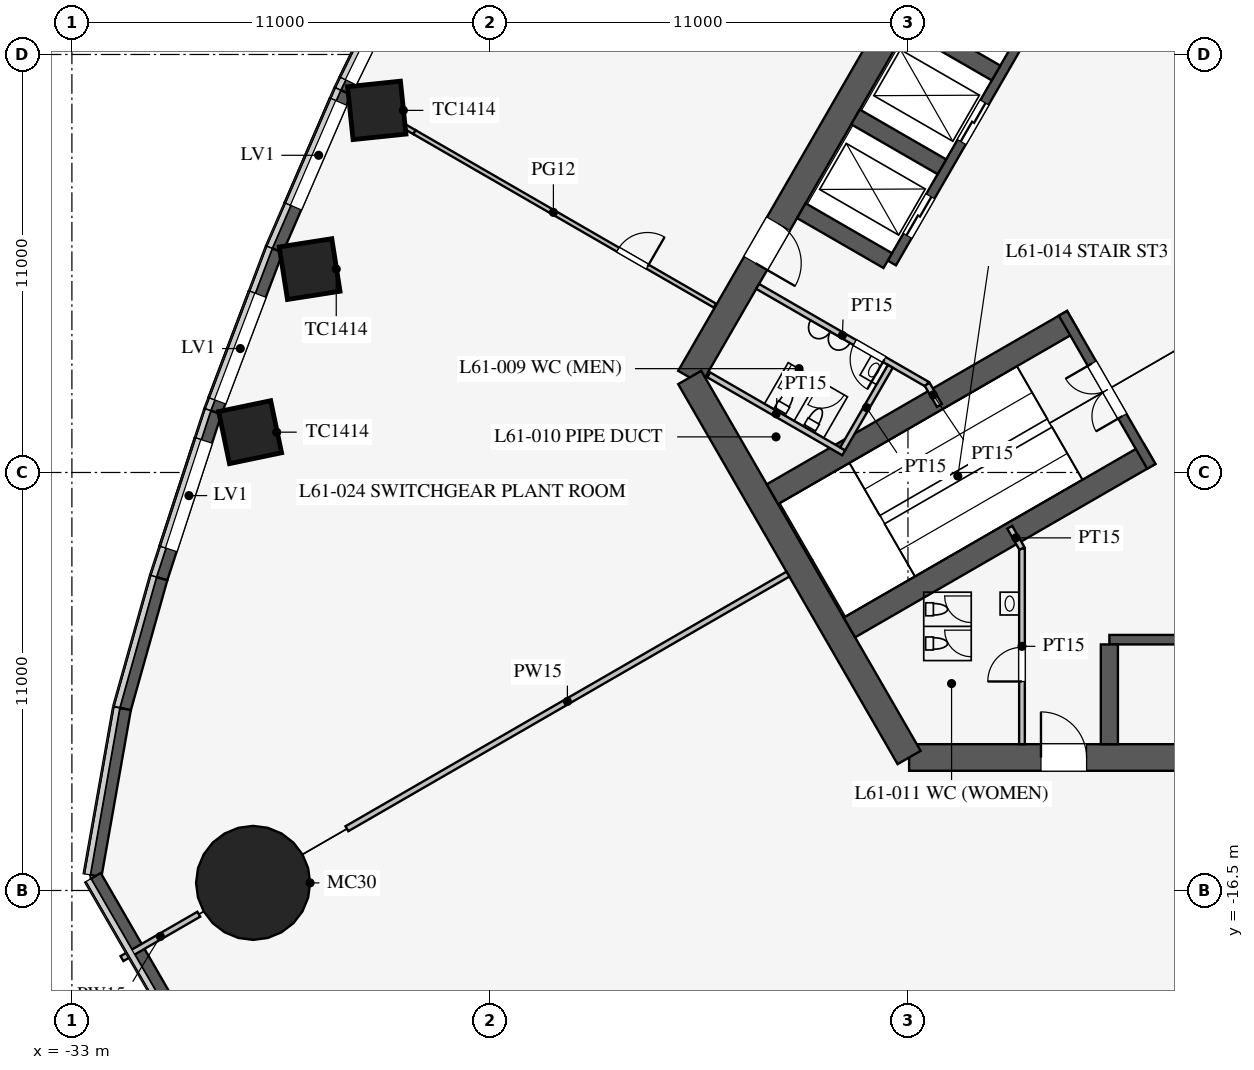
"""IFC4 building model, lengths in metres.
Left out: names, types, materials, properties, quantities, classifications, styles, units other than length and angle.
Written with IfcOpenShell. Run it as: python <this file> out.ifc"""

import sys

from ifc_helpers import new_model, si_unit, direction, frame, frame_2d, origin, origin_2d, place, context, subcontext, project, spatial, polyline, rectangle, circle, outline, extrude, clip, halfspace, element, fill, save


model = new_model("IFC4")
c1 = context("Model", 3, precision=1e-05, world=origin(), true_north=direction((0.0, 1.0)))
c2 = subcontext(c1, "Body", "Model", "MODEL_VIEW")
j1 = project(units=[si_unit("LENGTHUNIT", "METRE"), si_unit("PLANEANGLEUNIT", "RADIAN")], contexts=[c1])
p1 = place(None, origin())
s1 = spatial("IfcSite", under=j1, at=p1, CompositionType="ELEMENT")
p2 = place(p1, origin())
s2 = spatial("IfcBuilding", under=s1, at=p2, CompositionType="ELEMENT")
p3 = place(p2, frame((0.0, 0.0, 265.3)))
s3 = spatial("IfcBuildingStorey", under=s2, at=p3, CompositionType="ELEMENT", Elevation=265.3)
p4 = place(p3, frame((-25.227, 4.172, 0.0), z_axis=(0.201282046639, -0.116233851942, 0.972612579275), x_axis=(-0.410094064626, -0.911725070406, -0.024088465132)))
e1 = element("IfcColumn", 1, at=p4, inside=s3, PredefinedType="COLUMN", context=c2, shape_type="Clipping", body=[
    clip(clip(extrude(rectangle(XDim=1.4, YDim=1.4, at=origin_2d()), origin(), (0.0, 0.0, 1.0), 6.169), halfspace(frame((0.0, 0.0, 0.185), z_axis=(-2.1284951141970626e-05, -6.9994991401256534e-06, 0.999999999748979), x_axis=(0.0, 0.9999999999755035, 6.999499141711211e-06)), True)), halfspace(frame((0.0, 0.0, 5.984), z_axis=(2.1284951141970626e-05, 6.9994991401256534e-06, -0.999999999748979), x_axis=(0.0, -0.9999999999755035, -6.999499141711211e-06)), True)),
])
p5 = place(p3, frame((-27.022, 0.013, 0.0), z_axis=(0.223891049085, -0.129279785892, 0.96600182976), x_axis=(-0.364788927644, -0.930232982642, -0.03994541618)))
e2 = element("IfcColumn", 2, at=p5, inside=s3, PredefinedType="COLUMN", context=c2, shape_type="Clipping", body=[
    clip(clip(extrude(rectangle(XDim=1.4, YDim=1.4, at=origin_2d()), origin(), (0.0, 0.0, 1.0), 6.211), halfspace(frame((0.0, 0.0, 0.215), z_axis=(-1.7703553432418806e-05, -2.2252505130410105e-05, 0.9999999995957052), x_axis=(0.0, 0.999999999752413, 2.2252505133897248e-05)), True)), halfspace(frame((0.0, 0.0, 5.996), z_axis=(1.7703553432418806e-05, 2.2252505130410105e-05, -0.9999999995957052), x_axis=(0.0, -0.999999999752413, -2.2252505133897248e-05)), True)),
])
p6 = place(p3, frame((-28.632, -4.254, 0.0), z_axis=(0.255546793754, -0.147542991373, 0.955472083265), x_axis=(-0.320581329676, -0.945304069978, -0.060231439844)))
e3 = element("IfcColumn", 3, at=p6, inside=s3, PredefinedType="COLUMN", context=c2, shape_type="Clipping", body=[
    clip(clip(extrude(rectangle(XDim=1.4, YDim=1.4, at=origin_2d()), origin(), (0.0, 0.0, 1.0), 6.28), halfspace(frame((0.0, 0.0, 0.257), z_axis=(-7.594889496753688e-06, -2.3779827352743425e-05, 0.9999999996884188), x_axis=(0.0, 0.99999999971726, 2.3779827353429264e-05)), True)), halfspace(frame((0.0, 0.0, 6.023), z_axis=(7.594889496753688e-06, 2.3779827352743425e-05, -0.9999999996884188), x_axis=(0.0, -0.99999999971726, -2.3779827353429264e-05)), True)),
])
p7 = place(p3, frame((-28.579, -16.5, 0.0), z_axis=(0.273879842323, 0.158113013975, 0.948678083852), x_axis=(-0.499972520799, 0.866041268327, 0.0)))
e4 = element("IfcColumn", 4, at=p7, inside=s3, PredefinedType="COLUMN", context=c2, shape_type="Clipping", body=[
    clip(clip(extrude(circle(Radius=1.5, at=origin_2d()), origin(), (0.0, 0.0, 1.0), 6.325), halfspace(frame((0.0, 0.0, 0.501), z_axis=(1.0033762616878938e-05, 1.6488271940395816e-05, 0.9999999998137303), x_axis=(0.0, 0.9999999998640685, -1.6488271941225806e-05)), True)), halfspace(frame((0.0, 0.0, 5.823), z_axis=(-1.0033762616878938e-05, -1.6488271940395816e-05, -0.9999999998137303), x_axis=(0.0, -0.9999999998640685, 1.6488271941225806e-05)), True)),
])
p8 = place(p3, frame((-10.97, -13.0, 0.0), z_axis=(0.0, 0.0, 1.0), x_axis=(1.0, 0.0, 0.0)))
e5 = element("IfcWall", 5, at=p8, inside=s3, PredefinedType="SHEAR", context=c2, shape_type="SweptSolid", body=[
    extrude(rectangle(XDim=21.939, YDim=0.7, at=frame_2d((10.97, 0.0))), origin(), (0.0, 0.0, 1.0), 6.0),
])
p9 = place(p8, frame((17.27, 0.0, 0.0)))
e6 = element("IfcOpeningElement", 6, at=p9, cuts=e5, PredefinedType="OPENING", context=c2, shape_type="SweptSolid", body=[
    extrude(rectangle(XDim=1.2, YDim=2.1, at=frame_2d((0.6, 1.05))), frame((0.0, 0.36, 0.0), z_axis=(0.0, -1.0, 0.0), x_axis=(1.0, 0.0, 0.0)), (0.0, 0.0, 1.0), 0.72),
])
p10 = place(p8, frame((3.47, 0.0, 0.0)))
e7 = element("IfcOpeningElement", 7, at=p10, cuts=e5, PredefinedType="OPENING", context=c2, shape_type="SweptSolid", body=[
    extrude(rectangle(XDim=1.2, YDim=2.1, at=frame_2d((0.6, 1.05))), frame((0.0, 0.36, 0.0), z_axis=(0.0, -1.0, 0.0), x_axis=(1.0, 0.0, 0.0)), (0.0, 0.0, 1.0), 0.72),
])
p11 = place(p3, frame((-5.773, 16.0, 0.0), z_axis=(0.0, 0.0, 1.0), x_axis=(-0.500002442456, -0.866023993627, 0.0)))
e8 = element("IfcWall", 8, at=p11, inside=s3, PredefinedType="SHEAR", context=c2, shape_type="SweptSolid", body=[
    extrude(rectangle(XDim=21.939, YDim=0.7, at=frame_2d((10.97, 0.0))), origin(), (0.0, 0.0, 1.0), 6.0),
])
p12 = place(p11, frame((17.27, 0.0, 0.0)))
e9 = element("IfcOpeningElement", 9, at=p12, cuts=e8, PredefinedType="OPENING", context=c2, shape_type="SweptSolid", body=[
    extrude(rectangle(XDim=1.2, YDim=2.1, at=frame_2d((0.6, 1.05))), frame((0.0, 0.36, 0.0), z_axis=(0.0, -1.0, 0.0), x_axis=(1.0, 0.0, 0.0)), (0.0, 0.0, 1.0), 0.72),
])
p13 = place(p11, frame((3.47, 0.0, 0.0)))
e10 = element("IfcOpeningElement", 10, at=p13, cuts=e8, PredefinedType="OPENING", context=c2, shape_type="SweptSolid", body=[
    extrude(rectangle(XDim=1.2, YDim=2.1, at=frame_2d((0.6, 1.05))), frame((0.0, 0.36, 0.0), z_axis=(0.0, -1.0, 0.0), x_axis=(1.0, 0.0, 0.0)), (0.0, 0.0, 1.0), 0.72),
])
p14 = place(p3, frame((-16.743, -3.0, 0.0), z_axis=(0.0, 0.0, 1.0), x_axis=(0.499995765644, -0.866027848477, 0.0)))
e11 = element("IfcWall", 11, at=p14, inside=s3, PredefinedType="SHEAR", context=c2, shape_type="SweptSolid", body=[
    extrude(rectangle(XDim=11.547, YDim=0.7, at=frame_2d((5.773, 0.0))), origin(), (0.0, 0.0, 1.0), 6.0),
])
p15 = place(p3, frame((-5.7, -9.9, 0.0), z_axis=(0.0, 0.0, 1.0), x_axis=(1.0, 0.0, 0.0)))
e12 = element("IfcWall", 12, at=p15, inside=s3, PredefinedType="SHEAR", context=c2, shape_type="SweptSolid", body=[
    extrude(rectangle(XDim=11.4, YDim=0.25, at=frame_2d((5.7, 0.0))), origin(), (0.0, 0.0, 1.0), 6.0),
])
p16 = place(p3, frame((-5.7, -10.025, 0.0), z_axis=(0.0, 0.0, 1.0), x_axis=(0.0, -1.0, 0.0)))
e13 = element("IfcWall", 13, at=p16, inside=s3, PredefinedType="SHEAR", context=c2, shape_type="SweptSolid", body=[
    extrude(rectangle(XDim=2.625, YDim=0.45, at=frame_2d((1.312, 0.0))), origin(), (0.0, 0.0, 1.0), 6.0),
])
p17 = place(p3, frame((-5.724, 9.886, 0.0), z_axis=(0.0, 0.0, 1.0), x_axis=(-0.500001763848, -0.866024385424, 0.0)))
e14 = element("IfcWall", 14, at=p17, inside=s3, PredefinedType="SHEAR", context=c2, shape_type="SweptSolid", body=[
    extrude(rectangle(XDim=11.4, YDim=0.25, at=frame_2d((5.7, 0.0))), origin(), (0.0, 0.0, 1.0), 6.0),
])
p18 = place(p17, frame((6.525, 0.0, 0.0)))
e15 = element("IfcOpeningElement", 15, at=p18, cuts=e14, PredefinedType="OPENING", context=c2, shape_type="SweptSolid", body=[
    extrude(rectangle(XDim=1.2, YDim=2.2, at=frame_2d((0.6, 1.1))), frame((0.0, 0.135, 0.0), z_axis=(0.0, -1.0, 0.0), x_axis=(1.0, 0.0, 0.0)), (0.0, 0.0, 1.0), 0.27),
])
p19 = place(p17, frame((9.375, 0.0, 0.0)))
e16 = element("IfcOpeningElement", 16, at=p19, cuts=e14, PredefinedType="OPENING", context=c2, shape_type="SweptSolid", body=[
    extrude(rectangle(XDim=1.2, YDim=2.2, at=frame_2d((0.6, 1.1))), frame((0.0, 0.135, 0.0), z_axis=(0.0, -1.0, 0.0), x_axis=(1.0, 0.0, 0.0)), (0.0, 0.0, 1.0), 0.27),
])
for number, where, z_axis, x_axis in (
    (17, (-8.682, 5.012, 0.0), (0.0, 0.0, 1.0), (-0.866, 0.5, 0.0)),
    (18, (-10.107, 2.544, 0.0), (0.0, 0.0, 1.0), (-0.866, 0.5, 0.0)),
    (19, (-11.532, 0.076, 0.0), (0.0, 0.0, 1.0), (-0.866, 0.5, 0.0)),
):
    element("IfcWall", number, at=place(p3, frame(where, z_axis=z_axis, x_axis=x_axis)), inside=s3, PredefinedType="SHEAR", context=c2, shape_type="SweptSolid", body=[
        extrude(rectangle(XDim=2.625, YDim=0.45, at=frame_2d((1.312, 0.0))), origin(), (0.0, 0.0, 1.0), 6.0),
    ])
for number, where, z_axis, x_axis in (
    (20, (-6.663, -1.509, 0.0), (0.0, 0.0, 1.0), (-0.866, -0.5, 0.0)),
    (21, (-4.638, -5.016, 0.0), (0.0, 0.0, 1.0), (-0.866, -0.5, 0.0)),
):
    element("IfcWall", number, at=place(p3, frame(where, z_axis=z_axis, x_axis=x_axis)), inside=s3, PredefinedType="SHEAR", context=c2, shape_type="SweptSolid", body=[
        extrude(rectangle(XDim=9.125, YDim=0.6, at=frame_2d((4.562, 0.0))), origin(), (0.0, 0.0, 1.0), 6.0),
    ])
p20 = place(p3, frame((-6.922, -1.312, 0.0), z_axis=(0.0, 0.0, 1.0), x_axis=(0.499984536904, -0.866034331223, 0.0)))
e22 = element("IfcWall", 22, at=p20, inside=s3, PredefinedType="SHEAR", context=c2, shape_type="SweptSolid", body=[
    extrude(rectangle(XDim=4.65, YDim=0.25, at=frame_2d((2.325, 0.0))), origin(), (0.0, 0.0, 1.0), 6.0),
])
p21 = place(p20, frame((1.525, 0.0, 0.0)))
e23 = element("IfcOpeningElement", 23, at=p21, cuts=e22, PredefinedType="OPENING", context=c2, shape_type="SweptSolid", body=[
    extrude(rectangle(XDim=1.6, YDim=2.1, at=frame_2d((0.8, 1.05))), frame((0.0, 0.135, 0.0), z_axis=(0.0, -1.0, 0.0), x_axis=(1.0, 0.0, 0.0)), (0.0, 0.0, 1.0), 0.27),
])
p22 = place(p3, frame((-23.812, 8.552, 0.0), z_axis=(0.0, 0.0, 1.0), x_axis=(-0.439163535873, -0.898407139753, 0.0)))
e24 = element("IfcWall", 24, at=p22, inside=s3, PredefinedType="SOLIDWALL", context=c2, shape_type="SweptSolid", body=[
    extrude(rectangle(XDim=4.511, YDim=0.3, at=frame_2d((2.255, 0.0))), origin(), (0.0, 0.0, 1.0), 5.8),
])
p23 = place(p22, frame((1.211, 0.0, 3.5)))
e25 = element("IfcOpeningElement", 25, at=p23, cuts=e24, PredefinedType="OPENING", context=c2, shape_type="SweptSolid", body=[
    extrude(rectangle(XDim=3.0, YDim=2.0, at=frame_2d((1.5, 1.0))), frame((0.0, 0.16, 0.0), z_axis=(0.0, -1.0, 0.0), x_axis=(1.0, 0.0, 0.0)), (0.0, 0.0, 1.0), 0.32),
])
p24 = place(p3, frame((-25.792, 4.499, 0.0), z_axis=(0.0, 0.0, 1.0), x_axis=(-0.397208101111, -0.917728567939, 0.0)))
e26 = element("IfcWall", 26, at=p24, inside=s3, PredefinedType="SOLIDWALL", context=c2, shape_type="SweptSolid", body=[
    extrude(rectangle(XDim=4.53, YDim=0.3, at=frame_2d((2.265, 0.0))), origin(), (0.0, 0.0, 1.0), 5.8),
])
p25 = place(p24, frame((0.3, 0.0, 3.5)))
e27 = element("IfcOpeningElement", 27, at=p25, cuts=e26, PredefinedType="OPENING", context=c2, shape_type="SweptSolid", body=[
    extrude(rectangle(XDim=3.0, YDim=2.0, at=frame_2d((1.5, 1.0))), frame((0.0, 0.16, 0.0), z_axis=(0.0, -1.0, 0.0), x_axis=(1.0, 0.0, 0.0)), (0.0, 0.0, 1.0), 0.32),
])
p26 = place(p3, frame((-27.592, 0.342, 0.0), z_axis=(0.0, 0.0, 1.0), x_axis=(-0.354202230189, -0.935168851133, 0.0)))
e28 = element("IfcWall", 28, at=p26, inside=s3, PredefinedType="SOLIDWALL", context=c2, shape_type="SweptSolid", body=[
    extrude(rectangle(XDim=4.56, YDim=0.3, at=frame_2d((2.28, 0.0))), origin(), (0.0, 0.0, 1.0), 5.8),
])
p27 = place(p26, frame((1.259, 0.0, 3.5)))
e29 = element("IfcOpeningElement", 29, at=p27, cuts=e28, PredefinedType="OPENING", context=c2, shape_type="SweptSolid", body=[
    extrude(rectangle(XDim=3.0, YDim=2.0, at=frame_2d((1.5, 1.0))), frame((0.0, 0.16, 0.0), z_axis=(0.0, -1.0, 0.0), x_axis=(1.0, 0.0, 0.0)), (0.0, 0.0, 1.0), 0.32),
])
p28 = place(p3, frame((-29.207, -3.922, 0.0), z_axis=(0.0, 0.0, 1.0), x_axis=(-0.310154105003, -0.950686294815, 0.0)))
e30 = element("IfcWall", 30, at=p28, inside=s3, PredefinedType="SOLIDWALL", context=c2, shape_type="SweptSolid", body=[
    extrude(rectangle(XDim=4.599, YDim=0.3, at=frame_2d((2.3, 0.0))), origin(), (0.0, 0.0, 1.0), 5.8),
])
p29 = place(p28, frame((0.8, 0.0, 3.5)))
e31 = element("IfcOpeningElement", 31, at=p29, cuts=e30, PredefinedType="OPENING", context=c2, shape_type="SweptSolid", body=[
    extrude(rectangle(XDim=3.0, YDim=2.0, at=frame_2d((1.5, 1.0))), frame((0.0, 0.16, 0.0), z_axis=(0.0, -1.0, 0.0), x_axis=(1.0, 0.0, 0.0)), (0.0, 0.0, 1.0), 0.32),
])
p30 = place(p3, frame((-30.633, -8.295, 0.0), z_axis=(0.0, 0.0, 1.0), x_axis=(-0.270338835198, -0.962765243548, 0.0)))
e32 = element("IfcWall", 32, at=p30, inside=s3, PredefinedType="SOLIDWALL", context=c2, shape_type="SweptSolid", body=[
    extrude(rectangle(XDim=3.563, YDim=0.3, at=frame_2d((1.782, 0.0))), origin(), (0.0, 0.0, 1.0), 5.8),
])
p31 = place(p3, frame((-31.597, -11.726, 0.0), z_axis=(0.0, 0.0, 1.0), x_axis=(-0.173619736019, -0.984812767619, 0.0)))
e33 = element("IfcWall", 33, at=p31, inside=s3, PredefinedType="SOLIDWALL", context=c2, shape_type="SweptSolid", body=[
    extrude(rectangle(XDim=4.458, YDim=0.3, at=frame_2d((2.229, 0.0))), origin(), (0.0, 0.0, 1.0), 5.8),
])
p32 = place(p3, frame((-32.371, -16.115, 0.0), z_axis=(0.0, 0.0, 1.0), x_axis=(0.499973719246, -0.866040576453, 0.0)))
e34 = element("IfcWall", 34, at=p32, inside=s3, PredefinedType="SOLIDWALL", context=c2, shape_type="SweptSolid", body=[
    extrude(rectangle(XDim=4.458, YDim=0.3, at=frame_2d((2.229, 0.0))), origin(), (0.0, 0.0, 1.0), 5.8),
])
p33 = place(p3, frame((-8.0, -7.5, 0.0), z_axis=(0.0, 0.0, 1.0), x_axis=(0.0, -1.0, 0.0)))
e35 = element("IfcWall", 35, at=p33, inside=s3, PredefinedType="PARTITIONING", context=c2, shape_type="SweptSolid", body=[
    extrude(rectangle(XDim=5.15, YDim=0.15, at=frame_2d((2.575, 0.0))), origin(), (0.0, 0.0, 1.0), 5.8),
])
p34 = place(p33, frame((2.6, 0.0, 0.0)))
e36 = element("IfcOpeningElement", 36, at=p34, cuts=e35, PredefinedType="OPENING", context=c2, shape_type="SweptSolid", body=[
    extrude(rectangle(XDim=0.9, YDim=2.1, at=frame_2d((0.45, 1.05))), frame((0.0, 0.085, 0.0), z_axis=(0.0, -1.0, 0.0), x_axis=(1.0, 0.0, 0.0)), (0.0, 0.0, 1.0), 0.17),
])
p35 = place(p3, frame((-10.495, -3.178, 0.0), z_axis=(0.0, 0.0, 1.0), x_axis=(-0.866037967349, 0.499978238636, 0.0)))
e37 = element("IfcWall", 37, at=p35, inside=s3, PredefinedType="PARTITIONING", context=c2, shape_type="SweptSolid", body=[
    extrude(rectangle(XDim=5.15, YDim=0.15, at=frame_2d((2.575, 0.0))), origin(), (0.0, 0.0, 1.0), 5.8),
])
p36 = place(p35, frame((1.3, 0.0, 0.0)))
e38 = element("IfcOpeningElement", 38, at=p36, cuts=e37, PredefinedType="OPENING", context=c2, shape_type="SweptSolid", body=[
    extrude(rectangle(XDim=0.9, YDim=2.1, at=frame_2d((0.45, 1.05))), frame((0.0, 0.085, 0.0), z_axis=(0.0, -1.0, 0.0), x_axis=(1.0, 0.0, 0.0)), (0.0, 0.0, 1.0), 0.17),
])
for number, where, z_axis, x_axis in (
    (39, (-10.495, -3.178, 0.0), (0.0, 0.0, 1.0), (0.5, -0.866, 0.0)),
    (40, (-8.0, -7.5, 0.0), (0.0, 0.0, 1.0), (-0.5, 0.866, 0.0)),
):
    element("IfcWall", number, at=place(p3, frame(where, z_axis=z_axis, x_axis=x_axis)), inside=s3, PredefinedType="PARTITIONING", context=c2, shape_type="SweptSolid", body=[
        extrude(rectangle(XDim=0.645, YDim=0.15, at=frame_2d((0.323, 0.0))), origin(), (0.0, 0.0, 1.0), 5.8),
    ])
p37 = place(p3, frame((-12.691, -4.982, 0.0), z_axis=(0.0, 0.0, 1.0), x_axis=(-0.8660249478, 0.500000789788, 0.0)))
e41 = element("IfcWall", 41, at=p37, inside=s3, PredefinedType="PARTITIONING", context=c2, shape_type="SweptSolid", body=[
    extrude(rectangle(XDim=4.1, YDim=0.15, at=frame_2d((2.05, 0.0))), origin(), (0.0, 0.0, 1.0), 5.8),
])
p38 = place(p3, frame((-11.464, -2.706, 0.0), z_axis=(0.0, 0.0, 1.0), x_axis=(-0.50001992892, -0.866013897511, 0.0)))
e42 = element("IfcWall", 42, at=p38, inside=s3, PredefinedType="PARTITIONING", context=c2, shape_type="SweptSolid", body=[
    extrude(rectangle(XDim=2.51, YDim=0.15, at=frame_2d((1.255, 0.0))), origin(), (0.0, 0.0, 1.0), 5.8),
])
p39 = place(p3, frame((-14.159, -8.175, 0.0), z_axis=(0.0, 0.0, 1.0), x_axis=(-0.866026905467, -0.499997399001, 0.0)))
e43 = element("IfcWall", 43, at=p39, inside=s3, PredefinedType="PARTITIONING", context=c2, shape_type="SweptSolid", body=[
    extrude(rectangle(XDim=13.4, YDim=0.15, at=frame_2d((6.7, 0.0))), origin(), (0.0, 0.0, 1.0), 4.3),
])
p40 = place(p3, frame((-29.661, -17.125, 0.0), z_axis=(0.0, 0.0, 1.0), x_axis=(-0.866027105532, -0.499997052475, 0.0)))
e44 = element("IfcWall", 44, at=p40, inside=s3, PredefinedType="PARTITIONING", context=c2, shape_type="SweptSolid", body=[
    extrude(rectangle(XDim=2.334, YDim=0.15, at=frame_2d((1.167, 0.0))), origin(), (0.0, 0.0, 1.0), 5.8),
])
p41 = place(p3, frame((-23.986, 3.456, 0.0), z_axis=(0.0, 0.0, 1.0), x_axis=(-0.866138304741, 0.499804398801, 0.0)))
e45 = element("IfcWall", 45, at=p41, inside=s3, PredefinedType="PARTITIONING", context=c2, shape_type="SweptSolid", body=[
    extrude(outline(polyline([(0.0, 0.0), (0.688, 0.0), (0.688, 0.05), (0.0, 2.9), (0.0, 0.0)])), frame((0.0, 0.06, 0.0), z_axis=(0.0, -1.0, 0.0), x_axis=(1.0, 0.0, 0.0)), (0.0, 0.0, 1.0), 0.12),
])
p42 = place(p3, frame((-16.079, -1.109, 0.0), z_axis=(0.0, 0.0, 1.0), x_axis=(-0.866026165896, 0.499998679983, 0.0)))
e46 = element("IfcWall", 46, at=p42, inside=s3, PredefinedType="PARTITIONING", context=c2, shape_type="SweptSolid", body=[
    extrude(rectangle(XDim=9.13, YDim=0.12, at=frame_2d((4.565, 0.0))), origin(), (0.0, 0.0, 1.0), 2.9),
])
p43 = place(p42, frame((2.05, 0.0, 0.0)))
e47 = element("IfcOpeningElement", 47, at=p43, cuts=e46, PredefinedType="OPENING", context=c2, shape_type="SweptSolid", body=[
    extrude(rectangle(XDim=0.9, YDim=2.1, at=frame_2d((0.45, 1.05))), frame((0.0, 0.07, 0.0), z_axis=(0.0, -1.0, 0.0), x_axis=(1.0, 0.0, 0.0)), (0.0, 0.0, 1.0), 0.14),
])
p44 = place(p23, origin())
e48 = element("IfcWindow", 48, at=p44, inside=s3, PartitioningType="SINGLE_PANEL", PredefinedType="USERDEFINED", context=c2, shape_type="SweptSolid", body=[
    extrude(rectangle(XDim=3.0, YDim=2.0, at=frame_2d((1.5, 1.0))), frame((0.0, 0.03, 0.0), z_axis=(0.0, -1.0, 0.0), x_axis=(1.0, 0.0, 0.0)), (0.0, 0.0, 1.0), 0.06),
])
fill(e25, e48)
p45 = place(p25, origin())
e49 = element("IfcWindow", 49, at=p45, inside=s3, PartitioningType="SINGLE_PANEL", PredefinedType="USERDEFINED", context=c2, shape_type="SweptSolid", body=[
    extrude(rectangle(XDim=3.0, YDim=2.0, at=frame_2d((1.5, 1.0))), frame((0.0, 0.03, 0.0), z_axis=(0.0, -1.0, 0.0), x_axis=(1.0, 0.0, 0.0)), (0.0, 0.0, 1.0), 0.06),
])
fill(e27, e49)
p46 = place(p27, origin())
e50 = element("IfcWindow", 50, at=p46, inside=s3, PartitioningType="SINGLE_PANEL", PredefinedType="USERDEFINED", context=c2, shape_type="SweptSolid", body=[
    extrude(rectangle(XDim=3.0, YDim=2.0, at=frame_2d((1.5, 1.0))), frame((0.0, 0.03, 0.0), z_axis=(0.0, -1.0, 0.0), x_axis=(1.0, 0.0, 0.0)), (0.0, 0.0, 1.0), 0.06),
])
fill(e29, e50)
p47 = place(p29, origin())
e51 = element("IfcWindow", 51, at=p47, inside=s3, PartitioningType="SINGLE_PANEL", PredefinedType="USERDEFINED", context=c2, shape_type="SweptSolid", body=[
    extrude(rectangle(XDim=3.0, YDim=2.0, at=frame_2d((1.5, 1.0))), frame((0.0, 0.03, 0.0), z_axis=(0.0, -1.0, 0.0), x_axis=(1.0, 0.0, 0.0)), (0.0, 0.0, 1.0), 0.06),
])
fill(e31, e51)
p48 = place(p34, frame((0.9, 0.0, 0.0), z_axis=(0.0, 0.0, 1.0), x_axis=(-1.0, 0.0, 0.0)))
e52 = element("IfcDoor", 52, at=p48, inside=s3, OperationType="SINGLE_SWING_LEFT", PredefinedType="DOOR", context=c2, shape_type="SweptSolid", body=[
    extrude(rectangle(XDim=0.9, YDim=2.1, at=frame_2d((0.45, 1.05))), frame((0.0, 0.025, 0.0), z_axis=(0.0, -1.0, 0.0), x_axis=(1.0, 0.0, 0.0)), (0.0, 0.0, 1.0), 0.05),
])
fill(e36, e52)
p49 = place(p36, origin())
e53 = element("IfcDoor", 53, at=p49, inside=s3, OperationType="SINGLE_SWING_LEFT", PredefinedType="DOOR", context=c2, shape_type="SweptSolid", body=[
    extrude(rectangle(XDim=0.9, YDim=2.1, at=frame_2d((0.45, 1.05))), frame((0.0, 0.025, 0.0), z_axis=(0.0, -1.0, 0.0), x_axis=(1.0, 0.0, 0.0)), (0.0, 0.0, 1.0), 0.05),
])
fill(e38, e53)
p50 = place(p21, frame((1.6, 0.0, 0.0), z_axis=(0.0, 0.0, 1.0), x_axis=(-1.0, 0.0, 0.0)))
e54 = element("IfcDoor", 54, at=p50, inside=s3, OperationType="DOUBLE_DOOR_SINGLE_SWING", PredefinedType="DOOR", context=c2, shape_type="SweptSolid", body=[
    extrude(rectangle(XDim=1.6, YDim=2.1, at=frame_2d((0.8, 1.05))), frame((0.0, 0.025, 0.0), z_axis=(0.0, -1.0, 0.0), x_axis=(1.0, 0.0, 0.0)), (0.0, 0.0, 1.0), 0.05),
])
fill(e23, e54)
p51 = place(p10, origin())
e55 = element("IfcDoor", 55, at=p51, inside=s3, OperationType="SINGLE_SWING_LEFT", PredefinedType="DOOR", context=c2, shape_type="SweptSolid", body=[
    extrude(rectangle(XDim=1.2, YDim=2.1, at=frame_2d((0.6, 1.05))), frame((0.0, 0.025, 0.0), z_axis=(0.0, -1.0, 0.0), x_axis=(1.0, 0.0, 0.0)), (0.0, 0.0, 1.0), 0.05),
])
fill(e7, e55)
p52 = place(p12, origin())
e56 = element("IfcDoor", 56, at=p52, inside=s3, OperationType="SINGLE_SWING_RIGHT", PredefinedType="DOOR", context=c2, shape_type="SweptSolid", body=[
    extrude(rectangle(XDim=1.2, YDim=2.1, at=frame_2d((0.6, 1.05))), frame((0.0, 0.025, 0.0), z_axis=(0.0, -1.0, 0.0), x_axis=(1.0, 0.0, 0.0)), (0.0, 0.0, 1.0), 0.05),
])
fill(e9, e56)
p53 = place(p43, frame((0.9, 0.0, 0.0), z_axis=(0.0, 0.0, 1.0), x_axis=(-1.0, 0.0, 0.0)))
e57 = element("IfcDoor", 57, at=p53, inside=s3, OperationType="SINGLE_SWING_RIGHT", PredefinedType="DOOR", context=c2, shape_type="SweptSolid", body=[
    extrude(rectangle(XDim=0.9, YDim=2.1, at=frame_2d((0.45, 1.05))), frame((0.0, 0.025, 0.0), z_axis=(0.0, -1.0, 0.0), x_axis=(1.0, 0.0, 0.0)), (0.0, 0.0, 1.0), 0.05),
])
fill(e47, e57)
p54 = place(p18, origin())
e58 = element("IfcDoor", 58, at=p54, inside=s3, OperationType="DOUBLE_DOOR_SLIDING", PredefinedType="DOOR", context=c2, shape_type="SweptSolid", body=[
    extrude(rectangle(XDim=1.2, YDim=2.2, at=frame_2d((0.6, 1.1))), frame((0.0, 0.025, 0.0), z_axis=(0.0, -1.0, 0.0), x_axis=(1.0, 0.0, 0.0)), (0.0, 0.0, 1.0), 0.05),
])
fill(e15, e58)
p55 = place(p19, origin())
e59 = element("IfcDoor", 59, at=p55, inside=s3, OperationType="DOUBLE_DOOR_SLIDING", PredefinedType="DOOR", context=c2, shape_type="SweptSolid", body=[
    extrude(rectangle(XDim=1.2, YDim=2.2, at=frame_2d((0.6, 1.1))), frame((0.0, 0.025, 0.0), z_axis=(0.0, -1.0, 0.0), x_axis=(1.0, 0.0, 0.0)), (0.0, 0.0, 1.0), 0.05),
])
fill(e16, e59)
save(model, sys.argv[1])
